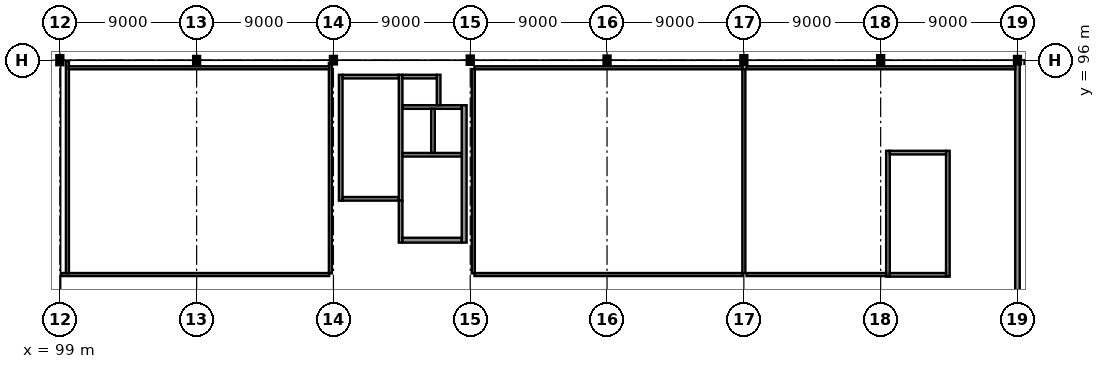
"""IFC4 building model, lengths in metres.
Left out: names, types, materials, properties, quantities, classifications, styles, units other than length and angle.
Written with IfcOpenShell. Run it as: python <this file> out.ifc"""

import sys

from ifc_helpers import new_model, si_unit, direction, frame, frame_2d, origin, origin_2d, place, context, subcontext, project, spatial, rectangle, i_section, extrude, element, fill, save


model = new_model("IFC4")
c1 = context("Model", 3, precision=1e-05, world=origin(), true_north=direction((0.0, 1.0)))
c2 = subcontext(c1, "Body", "Model", "MODEL_VIEW")
j1 = project(units=[si_unit("LENGTHUNIT", "METRE"), si_unit("PLANEANGLEUNIT", "RADIAN")], contexts=[c1])
p1 = place(None, origin())
s1 = spatial("IfcSite", under=j1, at=p1, CompositionType="ELEMENT")
p2 = place(p1, origin())
s2 = spatial("IfcBuilding", under=s1, at=p2, CompositionType="ELEMENT")
p3 = place(p2, frame((0.0, 0.0, 18.9)))
s3 = spatial("IfcBuildingStorey", under=s2, at=p3, CompositionType="ELEMENT", Elevation=18.9)
p4 = place(p3, frame((99.0, 96.0, 0.0), z_axis=(0.0, 0.0, 1.0), x_axis=(1.0, 0.0, 0.0)))
e1 = element("IfcColumn", 1, at=p4, inside=s3, PredefinedType="COLUMN", context=c2, shape_type="SweptSolid", body=[
    extrude(i_section(OverallWidth=0.3, OverallDepth=0.5, WebThickness=0.014, FlangeThickness=0.028, at=origin_2d()), origin(), (0.0, 0.0, 1.0), 4.5),
])
for number, where, z_axis, x_axis in (
    (2, (108.0, 96.0, 0.0), (0.0, 0.0, 1.0), (1.0, 0.0, 0.0)),
    (3, (117.0, 96.0, 0.0), (0.0, 0.0, 1.0), (1.0, 0.0, 0.0)),
):
    element("IfcColumn", number, at=place(p3, frame(where, z_axis=z_axis, x_axis=x_axis)), inside=s3, PredefinedType="COLUMN", context=c2, shape_type="SweptSolid", body=[
        extrude(i_section(OverallWidth=0.3, OverallDepth=0.4, WebThickness=0.013, FlangeThickness=0.024, at=origin_2d()), origin(), (0.0, 0.0, 1.0), 4.5),
    ])
for number, where, z_axis, x_axis in (
    (4, (126.0, 96.0, 0.0), (0.0, 0.0, 1.0), (0.0, 1.0, 0.0)),
    (5, (135.0, 96.0, 0.0), (0.0, 0.0, 1.0), (1.0, 0.0, 0.0)),
):
    element("IfcColumn", number, at=place(p3, frame(where, z_axis=z_axis, x_axis=x_axis)), inside=s3, PredefinedType="COLUMN", context=c2, shape_type="SweptSolid", body=[
        extrude(i_section(OverallWidth=0.3, OverallDepth=0.45, WebThickness=0.014, FlangeThickness=0.026, at=origin_2d()), origin(), (0.0, 0.0, 1.0), 4.5),
    ])
for number, where, z_axis, x_axis in (
    (6, (144.0, 96.0, 0.0), (0.0, 0.0, 1.0), (1.0, 0.0, 0.0)),
    (7, (153.0, 96.0, 0.0), (0.0, 0.0, 1.0), (1.0, 0.0, 0.0)),
):
    element("IfcColumn", number, at=place(p3, frame(where, z_axis=z_axis, x_axis=x_axis)), inside=s3, PredefinedType="COLUMN", context=c2, shape_type="SweptSolid", body=[
        extrude(i_section(OverallWidth=0.3, OverallDepth=0.5, WebThickness=0.014, FlangeThickness=0.028, at=origin_2d()), origin(), (0.0, 0.0, 1.0), 4.5),
    ])
p5 = place(p3, frame((162.0, 96.0, 0.0), z_axis=(0.0, 0.0, 1.0), x_axis=(1.0, 0.0, 0.0)))
e8 = element("IfcColumn", 8, at=p5, inside=s3, PredefinedType="COLUMN", context=c2, shape_type="SweptSolid", body=[
    extrude(i_section(OverallWidth=0.3, OverallDepth=0.4, WebThickness=0.013, FlangeThickness=0.024, at=origin_2d()), origin(), (0.0, 0.0, 1.0), 4.5),
])
p6 = place(p3, frame((162.0, 78.198, 0.0), z_axis=(0.0, 0.0, 1.0), x_axis=(0.0, 1.0, 0.0)))
e9 = element("IfcWall", 9, at=p6, inside=s3, PredefinedType="SOLIDWALL", context=c2, shape_type="SweptSolid", body=[
    extrude(rectangle(XDim=17.604, YDim=0.3, at=frame_2d((8.802, 0.0))), origin(), (0.0, 0.0, 1.0), 4.18),
])
p7 = place(p6, frame((8.302, 0.0, 0.0)))
e10 = element("IfcOpeningElement", 10, at=p7, cuts=e9, PredefinedType="OPENING", context=c2, shape_type="SweptSolid", body=[
    extrude(rectangle(XDim=1.0, YDim=2.2, at=frame_2d((0.5, 1.1))), frame((0.0, 0.165, 0.0), z_axis=(0.0, -1.0, 0.0), x_axis=(1.0, 0.0, 0.0)), (0.0, 0.0, 1.0), 0.33),
])
p8 = place(p3, frame((162.46, 95.88, 0.0), z_axis=(0.0, 0.0, 1.0), x_axis=(1.0, 0.0, 0.0)))
e11 = element("IfcWall", 11, at=p8, inside=s3, PredefinedType="PARAPET", context=c2, shape_type="SweptSolid", body=[
    extrude(rectangle(XDim=8.48, YDim=0.24, at=frame_2d((4.24, 0.0))), origin(), (0.0, 0.0, 1.0), 0.55),
])
p9 = place(p3, frame((117.48, 86.76, 0.0), z_axis=(0.0, 0.0, 1.0), x_axis=(0.0, 1.0, 0.0)))
e12 = element("IfcWall", 12, at=p9, inside=s3, PredefinedType="SHEAR", context=c2, shape_type="SweptSolid", body=[
    extrude(rectangle(XDim=8.28, YDim=0.24, at=frame_2d((4.14, 0.0))), origin(), (0.0, 0.0, 1.0), 4.31),
])
p10 = place(p3, frame((121.42, 86.76, 0.0), z_axis=(0.0, 0.0, 1.0), x_axis=(0.0, 1.0, 0.0)))
e13 = element("IfcWall", 13, at=p10, inside=s3, PredefinedType="SHEAR", context=c2, shape_type="SweptSolid", body=[
    extrude(rectangle(XDim=8.28, YDim=0.24, at=frame_2d((4.14, 0.0))), origin(), (0.0, 0.0, 1.0), 4.31),
])
p11 = place(p10, frame((0.54, 0.0, 0.0)))
e14 = element("IfcOpeningElement", 14, at=p11, cuts=e13, PredefinedType="OPENING", context=c2, shape_type="SweptSolid", body=[
    extrude(rectangle(XDim=1.2, YDim=2.15, at=frame_2d((0.6, 1.075))), frame((0.0, 0.135, 0.0), z_axis=(0.0, -1.0, 0.0), x_axis=(1.0, 0.0, 0.0)), (0.0, 0.0, 1.0), 0.27),
])
for number, where, z_axis, x_axis in (
    (15, (117.6, 86.88, 0.0), (0.0, 0.0, 1.0), (1.0, 0.0, 0.0)),
    (16, (117.6, 94.92, 0.0), (0.0, 0.0, 1.0), (1.0, 0.0, 0.0)),
):
    element("IfcWall", number, at=place(p3, frame(where, z_axis=z_axis, x_axis=x_axis)), inside=s3, PredefinedType="SHEAR", context=c2, shape_type="SweptSolid", body=[
        extrude(rectangle(XDim=3.7, YDim=0.24, at=frame_2d((1.85, 0.0))), origin(), (0.0, 0.0, 1.0), 4.31),
    ])
p12 = place(p3, frame((153.48, 81.76, 0.0), z_axis=(0.0, 0.0, 1.0), x_axis=(0.0, 1.0, 0.0)))
e17 = element("IfcWall", 17, at=p12, inside=s3, PredefinedType="SHEAR", context=c2, shape_type="SweptSolid", body=[
    extrude(rectangle(XDim=8.28, YDim=0.24, at=frame_2d((4.14, 0.0))), origin(), (0.0, 0.0, 1.0), 4.31),
])
p13 = place(p3, frame((157.42, 81.76, 0.0), z_axis=(0.0, 0.0, 1.0), x_axis=(0.0, 1.0, 0.0)))
e18 = element("IfcWall", 18, at=p13, inside=s3, PredefinedType="SHEAR", context=c2, shape_type="SweptSolid", body=[
    extrude(rectangle(XDim=8.28, YDim=0.24, at=frame_2d((4.14, 0.0))), origin(), (0.0, 0.0, 1.0), 4.31),
])
p14 = place(p13, frame((0.49, 0.0, 0.0)))
e19 = element("IfcOpeningElement", 19, at=p14, cuts=e18, PredefinedType="OPENING", context=c2, shape_type="SweptSolid", body=[
    extrude(rectangle(XDim=1.3, YDim=2.2, at=frame_2d((0.65, 1.1))), frame((0.0, 0.135, 0.0), z_axis=(0.0, -1.0, 0.0), x_axis=(1.0, 0.0, 0.0)), (0.0, 0.0, 1.0), 0.27),
])
for number, where, z_axis, x_axis in (
    (20, (153.6, 81.88, 0.0), (0.0, 0.0, 1.0), (1.0, 0.0, 0.0)),
    (21, (153.6, 89.92, 0.0), (0.0, 0.0, 1.0), (1.0, 0.0, 0.0)),
):
    element("IfcWall", number, at=place(p3, frame(where, z_axis=z_axis, x_axis=x_axis)), inside=s3, PredefinedType="SHEAR", context=c2, shape_type="SweptSolid", body=[
        extrude(rectangle(XDim=3.7, YDim=0.24, at=frame_2d((1.85, 0.0))), origin(), (0.0, 0.0, 1.0), 4.31),
    ])
p15 = place(p3, frame((121.42, 84.0, 0.0), z_axis=(0.0, 0.0, 1.0), x_axis=(0.0, 1.0, 0.0)))
e22 = element("IfcWall", 22, at=p15, inside=s3, PredefinedType="SHEAR", context=c2, shape_type="SweptSolid", body=[
    extrude(rectangle(XDim=2.76, YDim=0.24, at=frame_2d((1.38, 0.0))), origin(), (0.0, 0.0, 1.0), 4.16),
])
p16 = place(p3, frame((121.54, 84.16, 0.0), z_axis=(0.0, 0.0, 1.0), x_axis=(1.0, 0.0, 0.0)))
e23 = element("IfcWall", 23, at=p16, inside=s3, PredefinedType="SHEAR", context=c2, shape_type="SweptSolid", body=[
    extrude(rectangle(XDim=3.9, YDim=0.32, at=frame_2d((1.95, 0.0))), origin(), (0.0, 0.0, 1.0), 4.16),
])
p17 = place(p16, frame((1.225, 0.0, 0.0)))
e24 = element("IfcOpeningElement", 24, at=p17, cuts=e23, PredefinedType="OPENING", context=c2, shape_type="SweptSolid", body=[
    extrude(rectangle(XDim=1.45, YDim=2.2, at=frame_2d((0.725, 1.1))), frame((0.0, 0.175, 0.0), z_axis=(0.0, -1.0, 0.0), x_axis=(1.0, 0.0, 0.0)), (0.0, 0.0, 1.0), 0.35),
])
p18 = place(p3, frame((125.6, 84.0, 0.0), z_axis=(0.0, 0.0, 1.0), x_axis=(0.0, 1.0, 0.0)))
e25 = element("IfcWall", 25, at=p18, inside=s3, PredefinedType="SHEAR", context=c2, shape_type="SweptSolid", body=[
    extrude(rectangle(XDim=9.04, YDim=0.32, at=frame_2d((4.52, 0.0))), origin(), (0.0, 0.0, 1.0), 4.16),
])
p19 = place(p3, frame((121.54, 89.78, 0.0), z_axis=(0.0, 0.0, 1.0), x_axis=(1.0, 0.0, 0.0)))
e26 = element("IfcWall", 26, at=p19, inside=s3, PredefinedType="SHEAR", context=c2, shape_type="SweptSolid", body=[
    extrude(rectangle(XDim=3.9, YDim=0.24, at=frame_2d((1.95, 0.0))), origin(), (0.0, 0.0, 1.0), 4.31),
])
p20 = place(p19, frame((0.385, 0.0, 0.0)))
e27 = element("IfcOpeningElement", 27, at=p20, cuts=e26, PredefinedType="OPENING", context=c2, shape_type="SweptSolid", body=[
    extrude(rectangle(XDim=1.3, YDim=2.2, at=frame_2d((0.65, 1.1))), frame((0.0, 0.135, 0.0), z_axis=(0.0, -1.0, 0.0), x_axis=(1.0, 0.0, 0.0)), (0.0, 0.0, 1.0), 0.27),
])
p21 = place(p19, frame((2.335, 0.0, 0.0)))
e28 = element("IfcOpeningElement", 28, at=p21, cuts=e26, PredefinedType="OPENING", context=c2, shape_type="SweptSolid", body=[
    extrude(rectangle(XDim=1.3, YDim=2.2, at=frame_2d((0.65, 1.1))), frame((0.0, 0.135, 0.0), z_axis=(0.0, -1.0, 0.0), x_axis=(1.0, 0.0, 0.0)), (0.0, 0.0, 1.0), 0.27),
])
p22 = place(p3, frame((121.54, 92.92, 0.0), z_axis=(0.0, 0.0, 1.0), x_axis=(1.0, 0.0, 0.0)))
e29 = element("IfcWall", 29, at=p22, inside=s3, PredefinedType="SHEAR", context=c2, shape_type="SweptSolid", body=[
    extrude(rectangle(XDim=3.9, YDim=0.24, at=frame_2d((1.95, 0.0))), origin(), (0.0, 0.0, 1.0), 4.31),
])
p23 = place(p3, frame((123.55, 89.9, 0.0), z_axis=(0.0, 0.0, 1.0), x_axis=(0.0, 1.0, 0.0)))
e30 = element("IfcWall", 30, at=p23, inside=s3, PredefinedType="SHEAR", context=c2, shape_type="SweptSolid", body=[
    extrude(rectangle(XDim=2.9, YDim=0.24, at=frame_2d((1.45, 0.0))), origin(), (0.0, 0.0, 1.0), 4.31),
])
p24 = place(p3, frame((123.92, 93.04, 0.0), z_axis=(0.0, 0.0, 1.0), x_axis=(0.0, 1.0, 0.0)))
e31 = element("IfcWall", 31, at=p24, inside=s3, PredefinedType="SHEAR", context=c2, shape_type="SweptSolid", body=[
    extrude(rectangle(XDim=2.0, YDim=0.24, at=frame_2d((1.0, 0.0))), origin(), (0.0, 0.0, 1.0), 4.31),
])
p25 = place(p3, frame((121.54, 94.92, 0.0), z_axis=(0.0, 0.0, 1.0), x_axis=(1.0, 0.0, 0.0)))
e32 = element("IfcWall", 32, at=p25, inside=s3, PredefinedType="SHEAR", context=c2, shape_type="SweptSolid", body=[
    extrude(rectangle(XDim=2.26, YDim=0.24, at=frame_2d((1.13, 0.0))), origin(), (0.0, 0.0, 1.0), 4.31),
])
p26 = place(p3, frame((116.8, 95.802, 0.0), z_axis=(0.0, 0.0, 1.0), x_axis=(0.0, -1.0, 0.0)))
e33 = element("IfcWall", 33, at=p26, inside=s3, PredefinedType="PARTITIONING", context=c2, shape_type="SweptSolid", body=[
    extrude(rectangle(XDim=13.822, YDim=0.2, at=frame_2d((6.911, 0.0))), origin(), (0.0, 0.0, 1.0), 4.14),
])
p27 = place(p3, frame((116.72, 81.9, 0.0), z_axis=(0.0, 0.0, 1.0), x_axis=(-1.0, 0.0, 0.0)))
e34 = element("IfcWall", 34, at=p27, inside=s3, PredefinedType="PARTITIONING", context=c2, shape_type="SweptSolid", body=[
    extrude(rectangle(XDim=17.595, YDim=0.2, at=frame_2d((8.797, 0.0))), origin(), (0.0, 0.0, 1.0), 4.14),
])
p28 = place(p27, frame((7.947, 0.0, 0.0)))
e35 = element("IfcOpeningElement", 35, at=p28, cuts=e34, PredefinedType="OPENING", context=c2, shape_type="SweptSolid", body=[
    extrude(rectangle(XDim=1.7, YDim=2.4, at=frame_2d((0.85, 1.2))), frame((0.0, 0.115, 0.0), z_axis=(0.0, -1.0, 0.0), x_axis=(1.0, 0.0, 0.0)), (0.0, 0.0, 1.0), 0.23),
])
p29 = place(p3, frame((99.5, 81.98, 0.0), z_axis=(0.0, 0.0, 1.0), x_axis=(0.0, 1.0, 0.0)))
e36 = element("IfcWall", 36, at=p29, inside=s3, PredefinedType="PARTITIONING", context=c2, shape_type="SweptSolid", body=[
    extrude(rectangle(XDim=13.945, YDim=0.2, at=frame_2d((6.973, 0.0))), origin(), (0.0, 0.0, 1.0), 4.14),
])
p30 = place(p3, frame((99.58, 95.5, 0.0), z_axis=(0.0, 0.0, 1.0), x_axis=(1.0, 0.0, 0.0)))
e37 = element("IfcWall", 37, at=p30, inside=s3, PredefinedType="PARTITIONING", context=c2, shape_type="SweptSolid", body=[
    extrude(rectangle(XDim=17.14, YDim=0.2, at=frame_2d((8.57, 0.0))), origin(), (0.0, 0.0, 1.0), 4.14),
])
p31 = place(p3, frame((143.92, 81.9, 0.0), z_axis=(0.0, 0.0, 1.0), x_axis=(-1.0, 0.0, 0.0)))
e38 = element("IfcWall", 38, at=p31, inside=s3, PredefinedType="PARTITIONING", context=c2, shape_type="SweptSolid", body=[
    extrude(rectangle(XDim=17.64, YDim=0.2, at=frame_2d((8.82, 0.0))), origin(), (0.0, 0.0, 1.0), 4.14),
])
p32 = place(p31, frame((7.82, 0.0, 0.0)))
e39 = element("IfcOpeningElement", 39, at=p32, cuts=e38, PredefinedType="OPENING", context=c2, shape_type="SweptSolid", body=[
    extrude(rectangle(XDim=2.0, YDim=2.6, at=frame_2d((1.0, 1.3))), frame((0.0, 0.115, 0.0), z_axis=(0.0, -1.0, 0.0), x_axis=(1.0, 0.0, 0.0)), (0.0, 0.0, 1.0), 0.23),
])
p33 = place(p3, frame((126.2, 81.98, 0.0), z_axis=(0.0, 0.0, 1.0), x_axis=(0.0, 1.0, 0.0)))
e40 = element("IfcWall", 40, at=p33, inside=s3, PredefinedType="PARTITIONING", context=c2, shape_type="SweptSolid", body=[
    extrude(rectangle(XDim=13.44, YDim=0.2, at=frame_2d((6.72, 0.0))), origin(), (0.0, 0.0, 1.0), 4.14),
])
p34 = place(p3, frame((126.28, 95.5, 0.0), z_axis=(0.0, 0.0, 1.0), x_axis=(1.0, 0.0, 0.0)))
e41 = element("IfcWall", 41, at=p34, inside=s3, PredefinedType="PARTITIONING", context=c2, shape_type="SweptSolid", body=[
    extrude(rectangle(XDim=17.64, YDim=0.2, at=frame_2d((8.82, 0.0))), origin(), (0.0, 0.0, 1.0), 4.14),
])
p35 = place(p3, frame((144.0, 95.42, 0.0), z_axis=(0.0, 0.0, 1.0), x_axis=(0.0, -1.0, 0.0)))
e42 = element("IfcWall", 42, at=p35, inside=s3, PredefinedType="PARTITIONING", context=c2, shape_type="SweptSolid", body=[
    extrude(rectangle(XDim=13.44, YDim=0.2, at=frame_2d((6.72, 0.0))), origin(), (0.0, 0.0, 1.0), 4.14),
])
p36 = place(p3, frame((153.365, 81.9, 0.0), z_axis=(0.0, 0.0, 1.0), x_axis=(-1.0, 0.0, 0.0)))
e43 = element("IfcWall", 43, at=p36, inside=s3, PredefinedType="PARTITIONING", context=c2, shape_type="SweptSolid", body=[
    extrude(rectangle(XDim=9.185, YDim=0.2, at=frame_2d((4.593, 0.0))), origin(), (0.0, 0.0, 1.0), 4.14),
])
p37 = place(p36, frame((3.643, 0.0, 0.0)))
e44 = element("IfcOpeningElement", 44, at=p37, cuts=e43, PredefinedType="OPENING", context=c2, shape_type="SweptSolid", body=[
    extrude(rectangle(XDim=1.9, YDim=2.5, at=frame_2d((0.95, 1.25))), frame((0.0, 0.115, 0.0), z_axis=(0.0, -1.0, 0.0), x_axis=(1.0, 0.0, 0.0)), (0.0, 0.0, 1.0), 0.23),
])
p38 = place(p3, frame((144.18, 95.5, 0.0), z_axis=(0.0, 0.0, 1.0), x_axis=(1.0, 0.0, 0.0)))
e45 = element("IfcWall", 45, at=p38, inside=s3, PredefinedType="PARTITIONING", context=c2, shape_type="SweptSolid", body=[
    extrude(rectangle(XDim=17.675, YDim=0.2, at=frame_2d((8.837, 0.0))), origin(), (0.0, 0.0, 1.0), 4.14),
])
p39 = place(p7, frame((1.0, 0.0, 0.0), z_axis=(0.0, 0.0, 1.0), x_axis=(-1.0, 0.0, 0.0)))
e46 = element("IfcDoor", 46, at=p39, inside=s3, OperationType="SINGLE_SWING_RIGHT", PredefinedType="DOOR", context=c2, shape_type="SweptSolid", body=[
    extrude(rectangle(XDim=1.0, YDim=2.2, at=frame_2d((0.5, 1.1))), frame((0.0, 0.025, 0.0), z_axis=(0.0, -1.0, 0.0), x_axis=(1.0, 0.0, 0.0)), (0.0, 0.0, 1.0), 0.05),
])
fill(e10, e46)
p40 = place(p11, frame((1.2, 0.0, 0.0), z_axis=(0.0, 0.0, 1.0), x_axis=(-1.0, 0.0, 0.0)))
e47 = element("IfcDoor", 47, at=p40, inside=s3, OperationType="SINGLE_SWING_RIGHT", PredefinedType="DOOR", context=c2, shape_type="SweptSolid", body=[
    extrude(rectangle(XDim=1.2, YDim=2.15, at=frame_2d((0.6, 1.075))), frame((0.0, 0.025, 0.0), z_axis=(0.0, -1.0, 0.0), x_axis=(1.0, 0.0, 0.0)), (0.0, 0.0, 1.0), 0.05),
])
fill(e14, e47)
p41 = place(p14, frame((1.3, 0.0, 0.0), z_axis=(0.0, 0.0, 1.0), x_axis=(-1.0, 0.0, 0.0)))
e48 = element("IfcDoor", 48, at=p41, inside=s3, OperationType="SINGLE_SWING_LEFT", PredefinedType="DOOR", context=c2, shape_type="SweptSolid", body=[
    extrude(rectangle(XDim=1.3, YDim=2.2, at=frame_2d((0.65, 1.1))), frame((0.0, 0.025, 0.0), z_axis=(0.0, -1.0, 0.0), x_axis=(1.0, 0.0, 0.0)), (0.0, 0.0, 1.0), 0.05),
])
fill(e19, e48)
p42 = place(p17, origin())
e49 = element("IfcDoor", 49, at=p42, inside=s3, OperationType="DOUBLE_DOOR_SINGLE_SWING", PredefinedType="DOOR", context=c2, shape_type="SweptSolid", body=[
    extrude(rectangle(XDim=1.45, YDim=2.2, at=frame_2d((0.725, 1.1))), frame((0.0, 0.025, 0.0), z_axis=(0.0, -1.0, 0.0), x_axis=(1.0, 0.0, 0.0)), (0.0, 0.0, 1.0), 0.05),
])
fill(e24, e49)
p43 = place(p20, origin())
e50 = element("IfcDoor", 50, at=p43, inside=s3, OperationType="DOUBLE_DOOR_SLIDING", PredefinedType="DOOR", context=c2, shape_type="SweptSolid", body=[
    extrude(rectangle(XDim=1.3, YDim=2.2, at=frame_2d((0.65, 1.1))), frame((0.0, 0.025, 0.0), z_axis=(0.0, -1.0, 0.0), x_axis=(1.0, 0.0, 0.0)), (0.0, 0.0, 1.0), 0.05),
])
fill(e27, e50)
p44 = place(p21, origin())
e51 = element("IfcDoor", 51, at=p44, inside=s3, OperationType="DOUBLE_DOOR_SLIDING", PredefinedType="DOOR", context=c2, shape_type="SweptSolid", body=[
    extrude(rectangle(XDim=1.3, YDim=2.2, at=frame_2d((0.65, 1.1))), frame((0.0, 0.025, 0.0), z_axis=(0.0, -1.0, 0.0), x_axis=(1.0, 0.0, 0.0)), (0.0, 0.0, 1.0), 0.05),
])
fill(e28, e51)
p45 = place(p28, origin())
e52 = element("IfcDoor", 52, at=p45, inside=s3, OperationType="DOUBLE_DOOR_SINGLE_SWING", PredefinedType="DOOR", context=c2, shape_type="SweptSolid", body=[
    extrude(rectangle(XDim=1.7, YDim=2.4, at=frame_2d((0.85, 1.2))), frame((0.0, 0.025, 0.0), z_axis=(0.0, -1.0, 0.0), x_axis=(1.0, 0.0, 0.0)), (0.0, 0.0, 1.0), 0.05),
])
fill(e35, e52)
p46 = place(p32, frame((2.0, 0.0, 0.0), z_axis=(0.0, 0.0, 1.0), x_axis=(-1.0, 0.0, 0.0)))
e53 = element("IfcDoor", 53, at=p46, inside=s3, OperationType="DOUBLE_DOOR_SINGLE_SWING", PredefinedType="DOOR", context=c2, shape_type="SweptSolid", body=[
    extrude(rectangle(XDim=2.0, YDim=2.6, at=frame_2d((1.0, 1.3))), frame((0.0, 0.025, 0.0), z_axis=(0.0, -1.0, 0.0), x_axis=(1.0, 0.0, 0.0)), (0.0, 0.0, 1.0), 0.05),
])
fill(e39, e53)
p47 = place(p37, origin())
e54 = element("IfcDoor", 54, at=p47, inside=s3, OperationType="DOUBLE_DOOR_SINGLE_SWING", PredefinedType="DOOR", context=c2, shape_type="SweptSolid", body=[
    extrude(rectangle(XDim=1.9, YDim=2.5, at=frame_2d((0.95, 1.25))), frame((0.0, 0.025, 0.0), z_axis=(0.0, -1.0, 0.0), x_axis=(1.0, 0.0, 0.0)), (0.0, 0.0, 1.0), 0.05),
])
fill(e44, e54)
save(model, sys.argv[1])
